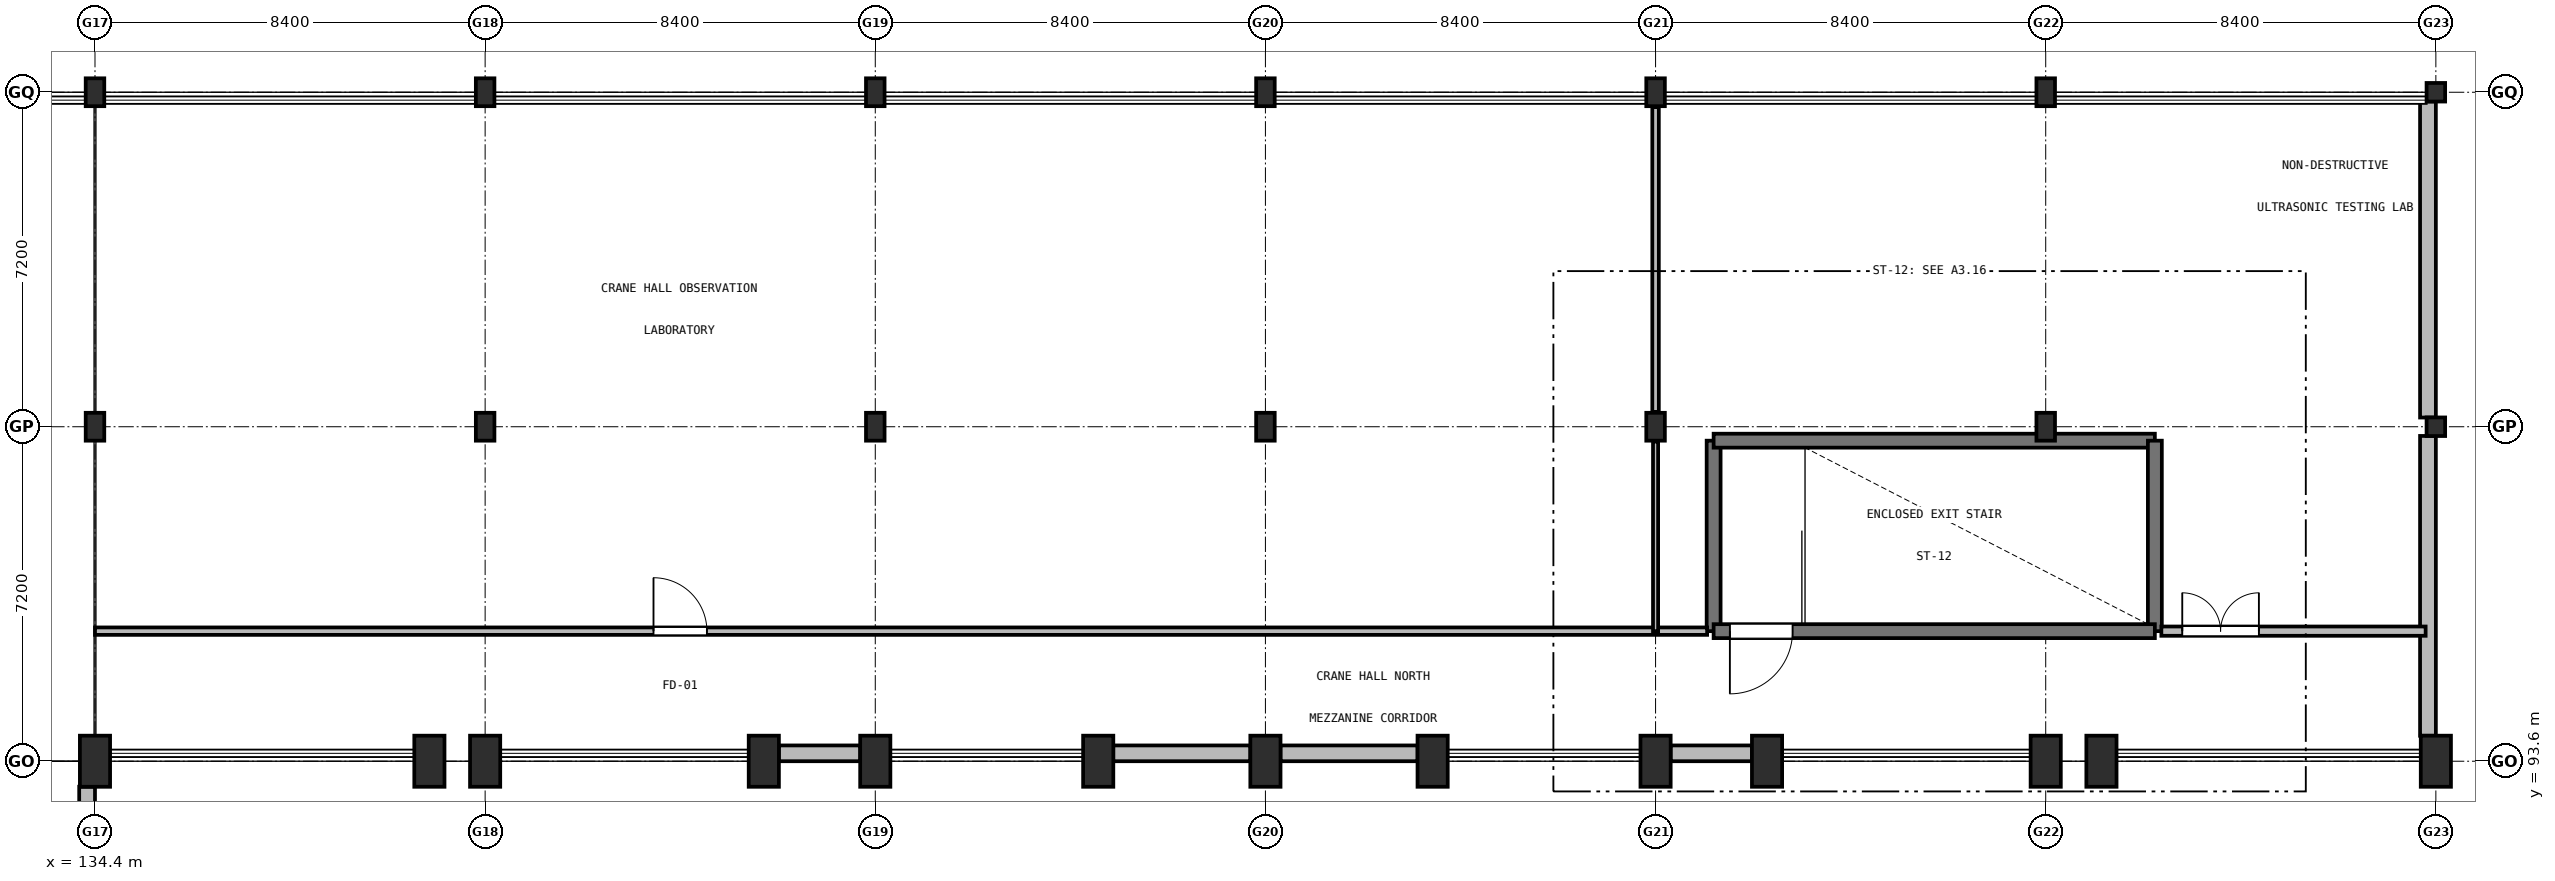
"""IFC4 building model, lengths in metres.
Left out: names, types, materials, properties, quantities, classifications, styles, units other than length and angle.
Written with IfcOpenShell. Run it as: python <this file> out.ifc"""

import sys

from ifc_helpers import new_model, si_unit, direction, frame, frame_2d, origin, origin_2d, place, context, subcontext, project, spatial, rectangle, i_section, extrude, element, fill, save


model = new_model("IFC4")
c1 = context("Model", 3, precision=1e-05, world=origin(), true_north=direction((0.0, 1.0)))
c2 = subcontext(c1, "Body", "Model", "MODEL_VIEW")
j1 = project(units=[si_unit("LENGTHUNIT", "METRE"), si_unit("PLANEANGLEUNIT", "RADIAN")], contexts=[c1])
p1 = place(None, origin())
s1 = spatial("IfcSite", under=j1, at=p1, CompositionType="ELEMENT")
p2 = place(p1, origin())
s2 = spatial("IfcBuilding", under=s1, at=p2, CompositionType="ELEMENT")
p3 = place(p2, frame((0.0, 0.0, 5.1)))
s3 = spatial("IfcBuildingStorey", under=s2, at=p3, CompositionType="ELEMENT", Elevation=5.1)
p4 = place(p3, frame((134.4, 93.6, 0.0), z_axis=(0.0, 0.0, 1.0), x_axis=(1.0, 0.0, 0.0)))
e1 = element("IfcColumn", 1, at=p4, inside=s3, PredefinedType="COLUMN", context=c2, shape_type="SweptSolid", body=[
    extrude(rectangle(XDim=0.65, YDim=1.1, at=origin_2d()), origin(), (0.0, 0.0, 1.0), 6.3),
])
for number, where, z_axis, x_axis in (
    (2, (134.4, 100.8, 0.0), (0.0, 0.0, 1.0), (1.0, 0.0, 0.0)),
    (3, (134.4, 108.0, 0.0), (0.0, 0.0, 1.0), (1.0, 0.0, 0.0)),
):
    element("IfcColumn", number, at=place(p3, frame(where, z_axis=z_axis, x_axis=x_axis)), inside=s3, PredefinedType="COLUMN", context=c2, shape_type="SweptSolid", body=[
        extrude(rectangle(XDim=0.4, YDim=0.6, at=origin_2d()), origin(), (0.0, 0.0, 1.0), 4.2),
    ])
for number, where, z_axis, x_axis in (
    (4, (141.6, 93.6, 0.0), (0.0, 0.0, 1.0), (1.0, 0.0, 0.0)),
    (5, (142.8, 93.6, 0.0), (0.0, 0.0, 1.0), (1.0, 0.0, 0.0)),
):
    element("IfcColumn", number, at=place(p3, frame(where, z_axis=z_axis, x_axis=x_axis)), inside=s3, PredefinedType="COLUMN", context=c2, shape_type="SweptSolid", body=[
        extrude(rectangle(XDim=0.65, YDim=1.1, at=origin_2d()), origin(), (0.0, 0.0, 1.0), 6.3),
    ])
for number, where, z_axis, x_axis in (
    (6, (142.8, 100.8, 0.0), (0.0, 0.0, 1.0), (1.0, 0.0, 0.0)),
    (7, (142.8, 108.0, 0.0), (0.0, 0.0, 1.0), (1.0, 0.0, 0.0)),
):
    element("IfcColumn", number, at=place(p3, frame(where, z_axis=z_axis, x_axis=x_axis)), inside=s3, PredefinedType="COLUMN", context=c2, shape_type="SweptSolid", body=[
        extrude(rectangle(XDim=0.4, YDim=0.6, at=origin_2d()), origin(), (0.0, 0.0, 1.0), 4.2),
    ])
for number, where, z_axis, x_axis in (
    (8, (148.8, 93.6, 0.0), (0.0, 0.0, 1.0), (1.0, 0.0, 0.0)),
    (9, (151.2, 93.6, 0.0), (0.0, 0.0, 1.0), (1.0, 0.0, 0.0)),
):
    element("IfcColumn", number, at=place(p3, frame(where, z_axis=z_axis, x_axis=x_axis)), inside=s3, PredefinedType="COLUMN", context=c2, shape_type="SweptSolid", body=[
        extrude(rectangle(XDim=0.65, YDim=1.1, at=origin_2d()), origin(), (0.0, 0.0, 1.0), 6.3),
    ])
for number, where, z_axis, x_axis in (
    (10, (151.2, 100.8, 0.0), (0.0, 0.0, 1.0), (1.0, 0.0, 0.0)),
    (11, (151.2, 108.0, 0.0), (0.0, 0.0, 1.0), (1.0, 0.0, 0.0)),
):
    element("IfcColumn", number, at=place(p3, frame(where, z_axis=z_axis, x_axis=x_axis)), inside=s3, PredefinedType="COLUMN", context=c2, shape_type="SweptSolid", body=[
        extrude(rectangle(XDim=0.4, YDim=0.6, at=origin_2d()), origin(), (0.0, 0.0, 1.0), 4.2),
    ])
for number, where, z_axis, x_axis in (
    (12, (156.0, 93.6, 0.0), (0.0, 0.0, 1.0), (1.0, 0.0, 0.0)),
    (13, (159.6, 93.6, 0.0), (0.0, 0.0, 1.0), (1.0, 0.0, 0.0)),
):
    element("IfcColumn", number, at=place(p3, frame(where, z_axis=z_axis, x_axis=x_axis)), inside=s3, PredefinedType="COLUMN", context=c2, shape_type="SweptSolid", body=[
        extrude(rectangle(XDim=0.65, YDim=1.1, at=origin_2d()), origin(), (0.0, 0.0, 1.0), 6.3),
    ])
for number, where, z_axis, x_axis in (
    (14, (159.6, 100.8, 0.0), (0.0, 0.0, 1.0), (1.0, 0.0, 0.0)),
    (15, (159.6, 108.0, 0.0), (0.0, 0.0, 1.0), (1.0, 0.0, 0.0)),
):
    element("IfcColumn", number, at=place(p3, frame(where, z_axis=z_axis, x_axis=x_axis)), inside=s3, PredefinedType="COLUMN", context=c2, shape_type="SweptSolid", body=[
        extrude(rectangle(XDim=0.4, YDim=0.6, at=origin_2d()), origin(), (0.0, 0.0, 1.0), 4.2),
    ])
for number, where, z_axis, x_axis in (
    (16, (163.2, 93.6, 0.0), (0.0, 0.0, 1.0), (1.0, 0.0, 0.0)),
    (17, (168.0, 93.6, 0.0), (0.0, 0.0, 1.0), (1.0, 0.0, 0.0)),
):
    element("IfcColumn", number, at=place(p3, frame(where, z_axis=z_axis, x_axis=x_axis)), inside=s3, PredefinedType="COLUMN", context=c2, shape_type="SweptSolid", body=[
        extrude(rectangle(XDim=0.65, YDim=1.1, at=origin_2d()), origin(), (0.0, 0.0, 1.0), 6.3),
    ])
for number, where, z_axis, x_axis in (
    (18, (168.0, 100.8, 0.0), (0.0, 0.0, 1.0), (1.0, 0.0, 0.0)),
    (19, (168.0, 108.0, 0.0), (0.0, 0.0, 1.0), (1.0, 0.0, 0.0)),
):
    element("IfcColumn", number, at=place(p3, frame(where, z_axis=z_axis, x_axis=x_axis)), inside=s3, PredefinedType="COLUMN", context=c2, shape_type="SweptSolid", body=[
        extrude(rectangle(XDim=0.4, YDim=0.6, at=origin_2d()), origin(), (0.0, 0.0, 1.0), 4.2),
    ])
for number, where, z_axis, x_axis in (
    (20, (170.4, 93.6, 0.0), (0.0, 0.0, 1.0), (1.0, 0.0, 0.0)),
    (21, (176.4, 93.6, 0.0), (0.0, 0.0, 1.0), (1.0, 0.0, 0.0)),
):
    element("IfcColumn", number, at=place(p3, frame(where, z_axis=z_axis, x_axis=x_axis)), inside=s3, PredefinedType="COLUMN", context=c2, shape_type="SweptSolid", body=[
        extrude(rectangle(XDim=0.65, YDim=1.1, at=origin_2d()), origin(), (0.0, 0.0, 1.0), 6.3),
    ])
for number, where, z_axis, x_axis in (
    (22, (176.4, 100.8, 0.0), (0.0, 0.0, 1.0), (1.0, 0.0, 0.0)),
    (23, (176.4, 108.0, 0.0), (0.0, 0.0, 1.0), (1.0, 0.0, 0.0)),
):
    element("IfcColumn", number, at=place(p3, frame(where, z_axis=z_axis, x_axis=x_axis)), inside=s3, PredefinedType="COLUMN", context=c2, shape_type="SweptSolid", body=[
        extrude(rectangle(XDim=0.4, YDim=0.6, at=origin_2d()), origin(), (0.0, 0.0, 1.0), 4.2),
    ])
for number, where, z_axis, x_axis in (
    (24, (177.6, 93.6, 0.0), (0.0, 0.0, 1.0), (1.0, 0.0, 0.0)),
    (25, (184.8, 93.6, 0.0), (0.0, 0.0, 1.0), (1.0, 0.0, 0.0)),
):
    element("IfcColumn", number, at=place(p3, frame(where, z_axis=z_axis, x_axis=x_axis)), inside=s3, PredefinedType="COLUMN", context=c2, shape_type="SweptSolid", body=[
        extrude(rectangle(XDim=0.65, YDim=1.1, at=origin_2d()), origin(), (0.0, 0.0, 1.0), 6.3),
    ])
for number, where, z_axis, x_axis in (
    (26, (184.8, 100.8, 0.0), (0.0, 0.0, 1.0), (1.0, 0.0, 0.0)),
    (27, (184.8, 108.0, 0.0), (0.0, 0.0, 1.0), (1.0, 0.0, 0.0)),
):
    element("IfcColumn", number, at=place(p3, frame(where, z_axis=z_axis, x_axis=x_axis)), inside=s3, PredefinedType="COLUMN", context=c2, shape_type="SweptSolid", body=[
        extrude(rectangle(XDim=0.4, YDim=0.4, at=origin_2d()), origin(), (0.0, 0.0, 1.0), 4.2),
    ])
p5 = place(p2, origin())
s4 = spatial("IfcBuildingStorey", under=s2, at=p5, CompositionType="ELEMENT", Elevation=0.0)
for number, where, z_axis, x_axis in (
    (28, (134.4, 92.75, 0.0), (0.0, 0.0, 1.0), (1.0, 0.0, 0.0)),
    (29, (142.8, 92.75, 0.0), (0.0, 0.0, 1.0), (1.0, 0.0, 0.0)),
    (30, (151.2, 92.75, 0.0), (0.0, 0.0, 1.0), (1.0, 0.0, 0.0)),
    (31, (159.6, 92.75, 0.0), (0.0, 0.0, 1.0), (1.0, 0.0, 0.0)),
    (32, (168.0, 92.75, 0.0), (0.0, 0.0, 1.0), (1.0, 0.0, 0.0)),
    (33, (176.4, 92.75, 0.0), (0.0, 0.0, 1.0), (1.0, 0.0, 0.0)),
    (34, (184.8, 92.75, 0.0), (0.0, 0.0, 1.0), (1.0, 0.0, 0.0)),
):
    element("IfcColumn", number, at=place(p5, frame(where, z_axis=z_axis, x_axis=x_axis)), inside=s4, PredefinedType="COLUMN", context=c2, shape_type="SweptSolid", body=[
        extrude(i_section(OverallWidth=0.3, OverallDepth=0.36, WebThickness=0.012, FlangeThickness=0.022, FilletRadius=0.027, at=origin_2d()), origin(), (0.0, 0.0, 1.0), 7.155),
    ])
p6 = place(p3, frame((184.63, 107.802, 0.0), z_axis=(0.0, 0.0, 1.0), x_axis=(0.0, -1.0, 0.0)))
e35 = element("IfcWall", 35, at=p6, inside=s3, PredefinedType="SOLIDWALL", context=c2, shape_type="SweptSolid", body=[
    extrude(rectangle(XDim=6.804, YDim=0.34, at=frame_2d((3.402, 0.0))), origin(), (0.0, 0.0, 1.0), 3.86),
])
p7 = place(p3, frame((184.63, 100.602, 0.0), z_axis=(0.0, 0.0, 1.0), x_axis=(0.0, -1.0, 0.0)))
e36 = element("IfcWall", 36, at=p7, inside=s3, PredefinedType="SOLIDWALL", context=c2, shape_type="SweptSolid", body=[
    extrude(rectangle(XDim=6.454, YDim=0.34, at=frame_2d((3.227, 0.0))), origin(), (0.0, 0.0, 1.0), 3.86),
])
p8 = place(p3, frame((170.077, 93.77, 0.0), z_axis=(0.0, 0.0, 1.0), x_axis=(-1.0, 0.0, 0.0)))
e37 = element("IfcWall", 37, at=p8, inside=s3, PredefinedType="SOLIDWALL", context=c2, shape_type="SweptSolid", body=[
    extrude(rectangle(XDim=1.754, YDim=0.34, at=frame_2d((0.877, 0.0))), origin(), (0.0, 0.0, 1.0), 3.448),
])
p9 = place(p3, frame((162.877, 93.77, 0.0), z_axis=(0.0, 0.0, 1.0), x_axis=(-1.0, 0.0, 0.0)))
e38 = element("IfcWall", 38, at=p9, inside=s3, PredefinedType="SOLIDWALL", context=c2, shape_type="SweptSolid", body=[
    extrude(rectangle(XDim=2.954, YDim=0.34, at=frame_2d((1.477, 0.0))), origin(), (0.0, 0.0, 1.0), 3.448),
])
p10 = place(p3, frame((159.277, 93.77, 0.0), z_axis=(0.0, 0.0, 1.0), x_axis=(-1.0, 0.0, 0.0)))
e39 = element("IfcWall", 39, at=p10, inside=s3, PredefinedType="SOLIDWALL", context=c2, shape_type="SweptSolid", body=[
    extrude(rectangle(XDim=2.954, YDim=0.34, at=frame_2d((1.477, 0.0))), origin(), (0.0, 0.0, 1.0), 3.448),
])
p11 = place(p3, frame((150.877, 93.77, 0.0), z_axis=(0.0, 0.0, 1.0), x_axis=(-1.0, 0.0, 0.0)))
e40 = element("IfcWall", 40, at=p11, inside=s3, PredefinedType="SOLIDWALL", context=c2, shape_type="SweptSolid", body=[
    extrude(rectangle(XDim=1.754, YDim=0.34, at=frame_2d((0.877, 0.0))), origin(), (0.0, 0.0, 1.0), 3.448),
])
p12 = place(p3, frame((134.23, 93.052, 0.0), z_axis=(0.0, 0.0, 1.0), x_axis=(0.0, -1.0, 0.0)))
e41 = element("IfcWall", 41, at=p12, inside=s3, PredefinedType="SOLIDWALL", context=c2, shape_type="SweptSolid", body=[
    extrude(rectangle(XDim=6.279, YDim=0.34, at=frame_2d((3.14, 0.0))), origin(), (0.0, 0.0, 1.0), 3.31),
])
p13 = place(p3, frame((169.25, 96.4, 0.0), z_axis=(0.0, 0.0, 1.0), x_axis=(0.0, 1.0, 0.0)))
e42 = element("IfcWall", 42, at=p13, inside=s3, PredefinedType="SHEAR", context=c2, shape_type="SweptSolid", body=[
    extrude(rectangle(XDim=4.1, YDim=0.3, at=frame_2d((2.05, 0.0))), origin(), (0.0, 0.0, 1.0), 3.92),
])
p14 = place(p3, frame((169.25, 100.5, 0.0), z_axis=(0.0, 0.0, 1.0), x_axis=(1.0, 0.0, 0.0)))
e43 = element("IfcWall", 43, at=p14, inside=s3, PredefinedType="SHEAR", context=c2, shape_type="SweptSolid", body=[
    extrude(rectangle(XDim=9.5, YDim=0.3, at=frame_2d((4.75, 0.0))), origin(), (0.0, 0.0, 1.0), 3.92),
])
p15 = place(p3, frame((178.75, 100.5, 0.0), z_axis=(0.0, 0.0, 1.0), x_axis=(0.0, -1.0, 0.0)))
e44 = element("IfcWall", 44, at=p15, inside=s3, PredefinedType="SHEAR", context=c2, shape_type="SweptSolid", body=[
    extrude(rectangle(XDim=4.1, YDim=0.3, at=frame_2d((2.05, 0.0))), origin(), (0.0, 0.0, 1.0), 3.92),
])
p16 = place(p3, frame((178.75, 96.4, 0.0), z_axis=(0.0, 0.0, 1.0), x_axis=(-1.0, 0.0, 0.0)))
e45 = element("IfcWall", 45, at=p16, inside=s3, PredefinedType="SHEAR", context=c2, shape_type="SweptSolid", body=[
    extrude(rectangle(XDim=9.5, YDim=0.3, at=frame_2d((4.75, 0.0))), origin(), (0.0, 0.0, 1.0), 3.92),
])
p17 = place(p16, frame((7.8, 0.0, 0.0)))
e46 = element("IfcOpeningElement", 46, at=p17, cuts=e45, PredefinedType="OPENING", context=c2, shape_type="SweptSolid", body=[
    extrude(rectangle(XDim=1.35, YDim=2.2, at=frame_2d((0.675, 1.1))), frame((0.0, 0.16, 0.0), z_axis=(0.0, -1.0, 0.0), x_axis=(1.0, 0.0, 0.0)), (0.0, 0.0, 1.0), 0.32),
])
p18 = place(p3, frame((134.4, 96.4, 0.0), z_axis=(0.0, 0.0, 1.0), x_axis=(1.0, 0.0, 0.0)))
e47 = element("IfcWall", 47, at=p18, inside=s3, PredefinedType="PARTITIONING", context=c2, shape_type="SweptSolid", body=[
    extrude(rectangle(XDim=34.71, YDim=0.16, at=frame_2d((17.355, 0.0))), origin(), (0.0, 0.0, 1.0), 3.85),
])
p19 = place(p18, frame((12.025, 0.0, 0.0)))
e48 = element("IfcOpeningElement", 48, at=p19, cuts=e47, PredefinedType="OPENING", context=c2, shape_type="SweptSolid", body=[
    extrude(rectangle(XDim=1.15, YDim=2.15, at=frame_2d((0.575, 1.075))), frame((0.0, 0.09, 0.0), z_axis=(0.0, -1.0, 0.0), x_axis=(1.0, 0.0, 0.0)), (0.0, 0.0, 1.0), 0.18),
])
p20 = place(p3, frame((178.89, 96.4, 0.0), z_axis=(0.0, 0.0, 1.0), x_axis=(1.0, 0.0, 0.0)))
e49 = element("IfcWall", 49, at=p20, inside=s3, PredefinedType="SOLIDWALL", context=c2, shape_type="SweptSolid", body=[
    extrude(rectangle(XDim=5.69, YDim=0.2, at=frame_2d((2.845, 0.0))), origin(), (0.0, 0.0, 1.0), 3.85),
])
p21 = place(p20, frame((0.45, 0.0, 0.0)))
e50 = element("IfcOpeningElement", 50, at=p21, cuts=e49, PredefinedType="OPENING", context=c2, shape_type="SweptSolid", body=[
    extrude(rectangle(XDim=1.65, YDim=2.2, at=frame_2d((0.825, 1.1))), frame((0.0, 0.11, 0.0), z_axis=(0.0, -1.0, 0.0), x_axis=(1.0, 0.0, 0.0)), (0.0, 0.0, 1.0), 0.22),
])
p22 = place(p3, frame((168.0, 96.4, 0.0), z_axis=(0.0, 0.0, 1.0), x_axis=(0.0, 1.0, 0.0)))
e51 = element("IfcWall", 51, at=p22, inside=s3, PredefinedType="PARTITIONING", context=c2, shape_type="SweptSolid", body=[
    extrude(rectangle(XDim=4.08, YDim=0.11, at=frame_2d((2.04, 0.0))), origin(), (0.0, 0.0, 1.0), 3.85),
])
p23 = place(p3, frame((168.0, 101.12, 0.0), z_axis=(0.0, 0.0, 1.0), x_axis=(0.0, 1.0, 0.0)))
e52 = element("IfcWall", 52, at=p23, inside=s3, PredefinedType="PARTITIONING", context=c2, shape_type="SweptSolid", body=[
    extrude(rectangle(XDim=6.56, YDim=0.14, at=frame_2d((3.28, 0.0))), origin(), (0.0, 0.0, 1.0), 3.85),
])
p24 = place(p17, origin())
e53 = element("IfcDoor", 53, at=p24, inside=s3, OperationType="SINGLE_SWING_RIGHT", PredefinedType="DOOR", context=c2, shape_type="SweptSolid", body=[
    extrude(rectangle(XDim=1.35, YDim=2.2, at=frame_2d((0.675, 1.1))), frame((0.0, 0.025, 0.0), z_axis=(0.0, -1.0, 0.0), x_axis=(1.0, 0.0, 0.0)), (0.0, 0.0, 1.0), 0.05),
])
fill(e46, e53)
p25 = place(p19, origin())
e54 = element("IfcDoor", 54, at=p25, inside=s3, OperationType="SINGLE_SWING_LEFT", PredefinedType="DOOR", context=c2, shape_type="SweptSolid", body=[
    extrude(rectangle(XDim=1.15, YDim=2.15, at=frame_2d((0.575, 1.075))), frame((0.0, 0.025, 0.0), z_axis=(0.0, -1.0, 0.0), x_axis=(1.0, 0.0, 0.0)), (0.0, 0.0, 1.0), 0.05),
])
fill(e48, e54)
p26 = place(p21, origin())
e55 = element("IfcDoor", 55, at=p26, inside=s3, OperationType="DOUBLE_DOOR_SINGLE_SWING", PredefinedType="DOOR", context=c2, shape_type="SweptSolid", body=[
    extrude(rectangle(XDim=1.65, YDim=2.2, at=frame_2d((0.825, 1.1))), frame((0.0, 0.025, 0.0), z_axis=(0.0, -1.0, 0.0), x_axis=(1.0, 0.0, 0.0)), (0.0, 0.0, 1.0), 0.05),
])
fill(e50, e55)
save(model, sys.argv[1])
